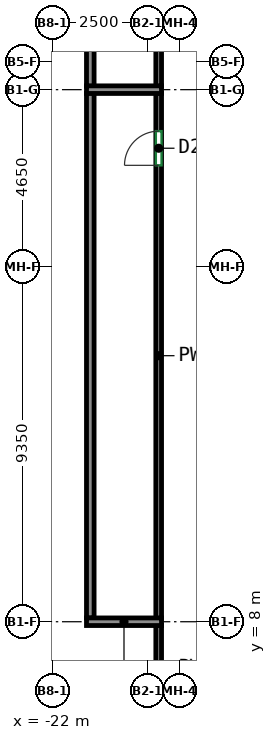
"""IFC4 building model, lengths in metres.
Left out: names, types, materials, properties, quantities, classifications, styles, units other than length and angle.
Written with IfcOpenShell. Run it as: python <this file> out.ifc"""

import sys

from ifc_helpers import new_model, si_unit, direction, frame, frame_2d, origin, place, context, subcontext, project, spatial, rectangle, extrude, element, fill, save


model = new_model("IFC4")
c1 = context("Model", 3, precision=1e-05, world=origin(), true_north=direction((0.0, 1.0)))
c2 = subcontext(c1, "Body", "Model", "MODEL_VIEW")
j1 = project(units=[si_unit("LENGTHUNIT", "METRE"), si_unit("PLANEANGLEUNIT", "RADIAN")], contexts=[c1])
p1 = place(None, origin())
s1 = spatial("IfcSite", under=j1, at=p1, CompositionType="ELEMENT")
p2 = place(p1, origin())
s2 = spatial("IfcBuilding", under=s1, at=p2, CompositionType="ELEMENT")
p3 = place(p2, frame((0.0, 0.0, 31.0)))
s3 = spatial("IfcBuildingStorey", under=s2, at=p3, CompositionType="ELEMENT", Elevation=31.0)
p4 = place(p3, frame((-19.2, 5.675, 0.0), z_axis=(0.0, 0.0, 1.0), x_axis=(0.0, 1.0, 0.0)))
e1 = element("IfcWall", 1, at=p4, inside=s3, PredefinedType="PARTITIONING", context=c2, shape_type="SweptSolid", body=[
    extrude(rectangle(XDim=2.235, YDim=0.15, at=frame_2d((1.117, 0.0))), origin(), (0.0, 0.0, 1.0), 3.72),
])
p5 = place(p3, frame((-19.2, 22.09, 0.0), z_axis=(0.0, 0.0, 1.0), x_axis=(0.0, 1.0, 0.0)))
e2 = element("IfcWall", 2, at=p5, inside=s3, PredefinedType="PARTITIONING", context=c2, shape_type="SweptSolid", body=[
    extrude(rectangle(XDim=2.335, YDim=0.15, at=frame_2d((1.167, 0.0))), origin(), (0.0, 0.0, 1.0), 3.72),
])
p6 = place(p3, frame((-19.2, 8.09, 0.0), z_axis=(0.0, 0.0, 1.0), x_axis=(0.0, 1.0, 0.0)))
e3 = element("IfcWall", 3, at=p6, inside=s3, PredefinedType="PARTITIONING", context=c2, shape_type="SweptSolid", body=[
    extrude(rectangle(XDim=13.82, YDim=0.15, at=frame_2d((6.91, 0.0))), origin(), (0.0, 0.0, 1.0), 3.72),
])
p7 = place(p6, frame((11.919, 0.0, 0.0)))
e4 = element("IfcOpeningElement", 4, at=p7, cuts=e3, PredefinedType="OPENING", context=c2, shape_type="SweptSolid", body=[
    extrude(rectangle(XDim=0.9, YDim=2.1, at=frame_2d((0.45, 1.05))), frame((0.0, 0.085, 0.0), z_axis=(0.0, -1.0, 0.0), x_axis=(1.0, 0.0, 0.0)), (0.0, 0.0, 1.0), 0.17),
])
p8 = place(p3, frame((-21.0, 22.09, 0.0), z_axis=(0.0, 0.0, 1.0), x_axis=(0.0, 1.0, 0.0)))
e5 = element("IfcWall", 5, at=p8, inside=s3, PredefinedType="PARTITIONING", context=c2, shape_type="SweptSolid", body=[
    extrude(rectangle(XDim=5.66, YDim=0.2, at=frame_2d((2.83, 0.0))), origin(), (0.0, 0.0, 1.0), 3.72),
])
p9 = place(p3, frame((-21.0, 8.1, 0.0), z_axis=(0.0, 0.0, 1.0), x_axis=(0.0, 1.0, 0.0)))
e6 = element("IfcWall", 6, at=p9, inside=s3, PredefinedType="PARTITIONING", context=c2, shape_type="SweptSolid", body=[
    extrude(rectangle(XDim=13.81, YDim=0.2, at=frame_2d((6.905, 0.0))), origin(), (0.0, 0.0, 1.0), 3.72),
])
p10 = place(p3, frame((-21.1, 8.0, 0.0), z_axis=(0.0, 0.0, 1.0), x_axis=(1.0, 0.0, 0.0)))
e7 = element("IfcWall", 7, at=p10, inside=s3, PredefinedType="PARTITIONING", context=c2, shape_type="SweptSolid", body=[
    extrude(rectangle(XDim=1.974, YDim=0.2, at=frame_2d((0.987, 0.0))), origin(), (0.0, 0.0, 1.0), 3.07),
])
p11 = place(p3, frame((-21.1, 22.0, 0.0), z_axis=(0.0, 0.0, 1.0), x_axis=(1.0, 0.0, 0.0)))
e8 = element("IfcWall", 8, at=p11, inside=s3, PredefinedType="PARTITIONING", context=c2, shape_type="SweptSolid", body=[
    extrude(rectangle(XDim=1.974, YDim=0.2, at=frame_2d((0.987, 0.0))), origin(), (0.0, 0.0, 1.0), 3.72),
])
p12 = place(p7, origin())
e9 = element("IfcDoor", 9, at=p12, inside=s3, OperationType="SINGLE_SWING_LEFT", PredefinedType="DOOR", context=c2, shape_type="SweptSolid", body=[
    extrude(rectangle(XDim=0.9, YDim=2.1, at=frame_2d((0.45, 1.05))), frame((0.0, 0.025, 0.0), z_axis=(0.0, -1.0, 0.0), x_axis=(1.0, 0.0, 0.0)), (0.0, 0.0, 1.0), 0.05),
])
fill(e4, e9)
save(model, sys.argv[1])
